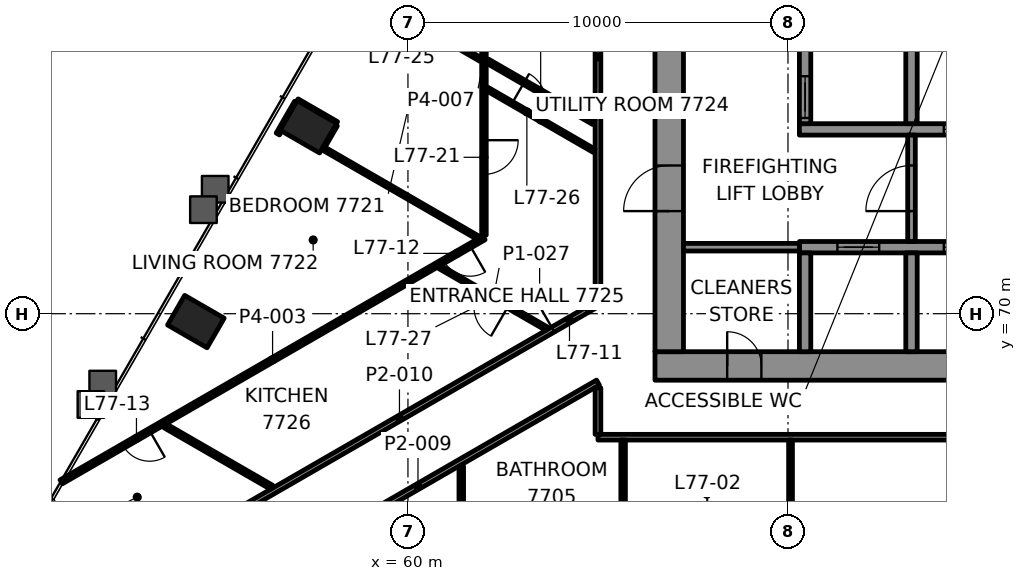
"""IFC4 building model, lengths in metres.
Left out: names, types, materials, properties, quantities, classifications, styles, units other than length and angle.
Written with IfcOpenShell. Run it as: python <this file> out.ifc"""

import sys

from ifc_helpers import new_model, si_unit, direction, frame, frame_2d, origin, origin_2d, place, context, subcontext, project, spatial, rectangle, hollow_rectangle, extrude, element, fill, save


model = new_model("IFC4")
c1 = context("Model", 3, precision=1e-05, world=origin(), true_north=direction((0.0, 1.0)))
c2 = subcontext(c1, "Body", "Model", "MODEL_VIEW")
j1 = project(units=[si_unit("LENGTHUNIT", "METRE"), si_unit("PLANEANGLEUNIT", "RADIAN")], contexts=[c1])
p1 = place(None, origin())
s1 = spatial("IfcSite", under=j1, at=p1, CompositionType="ELEMENT")
p2 = place(p1, origin())
s2 = spatial("IfcBuilding", under=s1, at=p2, CompositionType="ELEMENT")
p3 = place(p2, frame((0.0, 0.0, 316.1)))
s3 = spatial("IfcBuildingStorey", under=s2, at=p3, CompositionType="ELEMENT", Elevation=316.1)
for number, where, z_axis, x_axis in (
    (1, (57.379, 74.919, -0.0), (0.0, 0.0, 1.0), (-0.5, -0.866, 0.0)),
    (2, (54.419, 69.793, -0.0), (0.0, 0.0, 1.0), (-0.5, -0.866, 0.0)),
):
    element("IfcColumn", number, at=place(p3, frame(where, z_axis=z_axis, x_axis=x_axis)), inside=s3, PredefinedType="COLUMN", context=c2, shape_type="SweptSolid", body=[
        extrude(hollow_rectangle(XDim=0.9, YDim=1.2, WallThickness=0.06, at=origin_2d()), origin(), (0.0, 0.0, 1.0), 3.5),
    ])
p4 = place(p3, frame((66.5, 68.625, 0.0), z_axis=(0.0, 0.0, 1.0), x_axis=(1.0, 0.0, 0.0)))
e3 = element("IfcWall", 3, at=p4, inside=s3, PredefinedType="SHEAR", context=c2, shape_type="SweptSolid", body=[
    extrude(rectangle(XDim=17.0, YDim=0.75, at=frame_2d((8.5, 0.0))), origin(), (0.0, 0.0, 1.0), 3.3),
])
p5 = place(p4, frame((1.9, 0.0, 0.0)))
e4 = element("IfcOpeningElement", 4, at=p5, cuts=e3, PredefinedType="OPENING", context=c2, shape_type="SweptSolid", body=[
    extrude(rectangle(XDim=0.9, YDim=2.1, at=frame_2d((0.45, 1.05))), frame((0.0, 0.385, 0.0), z_axis=(0.0, -1.0, 0.0), x_axis=(1.0, 0.0, 0.0)), (0.0, 0.0, 1.0), 0.77),
])
p6 = place(p3, frame((66.875, 69.0, 0.0), z_axis=(0.0, 0.0, 1.0), x_axis=(0.0, 1.0, 0.0)))
e5 = element("IfcWall", 5, at=p6, inside=s3, PredefinedType="SHEAR", context=c2, shape_type="SweptSolid", body=[
    extrude(rectangle(XDim=12.0, YDim=0.75, at=frame_2d((6.0, 0.0))), origin(), (0.0, 0.0, 1.0), 3.3),
])
p7 = place(p6, frame((3.7, 0.0, 0.0)))
e6 = element("IfcOpeningElement", 6, at=p7, cuts=e5, PredefinedType="OPENING", context=c2, shape_type="SweptSolid", body=[
    extrude(rectangle(XDim=1.2, YDim=2.1, at=frame_2d((0.6, 1.05))), frame((0.0, 0.385, 0.0), z_axis=(0.0, -1.0, 0.0), x_axis=(1.0, 0.0, 0.0)), (0.0, 0.0, 1.0), 0.77),
])
p8 = place(p3, frame((70.3, 71.75, 0.0), z_axis=(0.0, 0.0, 1.0), x_axis=(1.0, 0.0, 0.0)))
e7 = element("IfcWall", 7, at=p8, inside=s3, PredefinedType="SHEAR", context=c2, shape_type="SweptSolid", body=[
    extrude(rectangle(XDim=11.5, YDim=0.3, at=frame_2d((5.75, 0.0))), origin(), (0.0, 0.0, 1.0), 3.3),
])
p9 = place(p8, frame((1.0, 0.0, 0.0)))
e8 = element("IfcOpeningElement", 8, at=p9, cuts=e7, PredefinedType="OPENING", context=c2, shape_type="SweptSolid", body=[
    extrude(rectangle(XDim=1.1, YDim=2.1, at=frame_2d((0.55, 1.05))), frame((0.0, 0.16, 0.0), z_axis=(0.0, -1.0, 0.0), x_axis=(1.0, 0.0, 0.0)), (0.0, 0.0, 1.0), 0.32),
])
p10 = place(p8, frame((3.8, 0.0, 0.0)))
e9 = element("IfcOpeningElement", 9, at=p10, cuts=e7, PredefinedType="OPENING", context=c2, shape_type="SweptSolid", body=[
    extrude(rectangle(XDim=1.1, YDim=2.1, at=frame_2d((0.55, 1.05))), frame((0.0, 0.16, 0.0), z_axis=(0.0, -1.0, 0.0), x_axis=(1.0, 0.0, 0.0)), (0.0, 0.0, 1.0), 0.32),
])
p11 = place(p8, frame((6.6, 0.0, 0.0)))
e10 = element("IfcOpeningElement", 10, at=p11, cuts=e7, PredefinedType="OPENING", context=c2, shape_type="SweptSolid", body=[
    extrude(rectangle(XDim=1.1, YDim=2.1, at=frame_2d((0.55, 1.05))), frame((0.0, 0.16, 0.0), z_axis=(0.0, -1.0, 0.0), x_axis=(1.0, 0.0, 0.0)), (0.0, 0.0, 1.0), 0.32),
])
p12 = place(p8, frame((9.4, 0.0, 0.0)))
e11 = element("IfcOpeningElement", 11, at=p12, cuts=e7, PredefinedType="OPENING", context=c2, shape_type="SweptSolid", body=[
    extrude(rectangle(XDim=1.1, YDim=2.1, at=frame_2d((0.55, 1.05))), frame((0.0, 0.16, 0.0), z_axis=(0.0, -1.0, 0.0), x_axis=(1.0, 0.0, 0.0)), (0.0, 0.0, 1.0), 0.32),
])
p13 = place(p3, frame((70.3, 74.85, 0.0), z_axis=(0.0, 0.0, 1.0), x_axis=(1.0, 0.0, 0.0)))
e12 = element("IfcWall", 12, at=p13, inside=s3, PredefinedType="SHEAR", context=c2, shape_type="SweptSolid", body=[
    extrude(rectangle(XDim=5.9, YDim=0.3, at=frame_2d((2.95, 0.0))), origin(), (0.0, 0.0, 1.0), 3.3),
])
p14 = place(p13, frame((3.8, 0.0, 0.0)))
e13 = element("IfcOpeningElement", 13, at=p14, cuts=e12, PredefinedType="OPENING", context=c2, shape_type="SweptSolid", body=[
    extrude(rectangle(XDim=1.1, YDim=2.1, at=frame_2d((0.55, 1.05))), frame((0.0, 0.16, 0.0), z_axis=(0.0, -1.0, 0.0), x_axis=(1.0, 0.0, 0.0)), (0.0, 0.0, 1.0), 0.32),
])
p15 = place(p3, frame((70.45, 69.0, 0.0), z_axis=(0.0, 0.0, 1.0), x_axis=(0.0, 1.0, 0.0)))
e14 = element("IfcWall", 14, at=p15, inside=s3, PredefinedType="SHEAR", context=c2, shape_type="SweptSolid", body=[
    extrude(rectangle(XDim=2.6, YDim=0.3, at=frame_2d((1.3, 0.0))), origin(), (0.0, 0.0, 1.0), 3.3),
])
p16 = place(p3, frame((70.45, 75.0, 0.0), z_axis=(0.0, 0.0, 1.0), x_axis=(0.0, 1.0, 0.0)))
e15 = element("IfcWall", 15, at=p16, inside=s3, PredefinedType="SHEAR", context=c2, shape_type="SweptSolid", body=[
    extrude(rectangle(XDim=2.6, YDim=0.3, at=frame_2d((1.3, 0.0))), origin(), (0.0, 0.0, 1.0), 3.3),
])
p17 = place(p16, frame((0.15, 0.0, 0.0)))
e16 = element("IfcOpeningElement", 16, at=p17, cuts=e15, PredefinedType="OPENING", context=c2, shape_type="SweptSolid", body=[
    extrude(rectangle(XDim=1.1, YDim=2.1, at=frame_2d((0.55, 1.05))), frame((0.0, 0.16, 0.0), z_axis=(0.0, -1.0, 0.0), x_axis=(1.0, 0.0, 0.0)), (0.0, 0.0, 1.0), 0.32),
])
for number, where, z_axis, x_axis in (
    (17, (73.25, 69.0, 0.0), (0.0, 0.0, 1.0), (0.0, 1.0, 0.0)),
    (18, (73.25, 75.0, 0.0), (0.0, 0.0, 1.0), (0.0, 1.0, 0.0)),
):
    element("IfcWall", number, at=place(p3, frame(where, z_axis=z_axis, x_axis=x_axis)), inside=s3, PredefinedType="SHEAR", context=c2, shape_type="SweptSolid", body=[
        extrude(rectangle(XDim=2.6, YDim=0.3, at=frame_2d((1.3, 0.0))), origin(), (0.0, 0.0, 1.0), 3.3),
    ])
p18 = place(p3, frame((85.0, 66.75, 0.0), z_axis=(0.0, 0.0, 1.0), x_axis=(-1.0, 0.0, 0.0)))
e19 = element("IfcWall", 19, at=p18, inside=s3, PredefinedType="PARTITIONING", context=c2, shape_type="SweptSolid", body=[
    extrude(rectangle(XDim=20.0, YDim=0.15, at=frame_2d((10.0, 0.0))), origin(), (0.0, 0.0, 1.0), 2.7),
])
p19 = place(p18, frame((2.135, 0.0, 0.0)))
e20 = element("IfcOpeningElement", 20, at=p19, cuts=e19, PredefinedType="OPENING", context=c2, shape_type="SweptSolid", body=[
    extrude(rectangle(XDim=1.0, YDim=2.1, at=frame_2d((0.5, 1.05))), frame((0.0, 0.085, 0.0), z_axis=(0.0, -1.0, 0.0), x_axis=(1.0, 0.0, 0.0)), (0.0, 0.0, 1.0), 0.17),
])
p20 = place(p18, frame((9.55, 0.0, 0.0)))
e21 = element("IfcOpeningElement", 21, at=p20, cuts=e19, PredefinedType="OPENING", context=c2, shape_type="SweptSolid", body=[
    extrude(rectangle(XDim=0.9, YDim=2.1, at=frame_2d((0.45, 1.05))), frame((0.0, 0.085, 0.0), z_axis=(0.0, -1.0, 0.0), x_axis=(1.0, 0.0, 0.0)), (0.0, 0.0, 1.0), 0.17),
])
p21 = place(p3, frame((65.0, 68.187, 0.0), z_axis=(0.0, 0.0, 1.0), x_axis=(-0.866028339337, -0.499994915439, 0.0)))
e22 = element("IfcWall", 22, at=p21, inside=s3, PredefinedType="PARTITIONING", context=c2, shape_type="SweptSolid", body=[
    extrude(rectangle(XDim=10.937, YDim=0.15, at=frame_2d((5.468, 0.0))), origin(), (0.0, 0.0, 1.0), 2.697),
])
p22 = place(p21, frame((6.943, 0.0, 0.0)))
e23 = element("IfcOpeningElement", 23, at=p22, cuts=e22, PredefinedType="OPENING", context=c2, shape_type="SweptSolid", body=[
    extrude(rectangle(XDim=1.0, YDim=2.1, at=frame_2d((0.5, 1.05))), frame((0.0, 0.085, 0.0), z_axis=(0.0, -1.0, 0.0), x_axis=(1.0, 0.0, 0.0)), (0.0, 0.0, 1.0), 0.17),
])
p23 = place(p3, frame((54.628, 64.278, 0.0), z_axis=(0.0, 0.0, 1.0), x_axis=(0.866033426221, 0.499986104476, 0.0)))
e24 = element("IfcWall", 24, at=p23, inside=s3, PredefinedType="PARTITIONING", context=c2, shape_type="SweptSolid", body=[
    extrude(rectangle(XDim=11.89, YDim=0.15, at=frame_2d((5.945, 0.0))), origin(), (0.0, 0.0, 1.0), 2.7),
])
p24 = place(p23, frame((10.612, 0.0, 0.0)))
e25 = element("IfcOpeningElement", 25, at=p24, cuts=e24, PredefinedType="OPENING", context=c2, shape_type="SweptSolid", body=[
    extrude(rectangle(XDim=1.0, YDim=2.1, at=frame_2d((0.5, 1.05))), frame((0.0, 0.085, 0.0), z_axis=(0.0, -1.0, 0.0), x_axis=(1.0, 0.0, 0.0)), (0.0, 0.0, 1.0), 0.17),
])
p25 = place(p3, frame((62.0, 71.998, 0.0), z_axis=(0.0, 0.0, 1.0), x_axis=(-0.866023842607, -0.500002704028, 0.0)))
e26 = element("IfcWall", 26, at=p25, inside=s3, PredefinedType="PARTITIONING", context=c2, shape_type="SweptSolid", body=[
    extrude(rectangle(XDim=12.845, YDim=0.12, at=frame_2d((6.422, 0.0))), origin(), (0.0, 0.0, 1.0), 2.7),
])
p26 = place(p25, frame((0.421, 0.0, 0.0)))
e27 = element("IfcOpeningElement", 27, at=p26, cuts=e26, PredefinedType="OPENING", context=c2, shape_type="SweptSolid", body=[
    extrude(rectangle(XDim=0.8, YDim=2.1, at=frame_2d((0.4, 1.05))), frame((0.0, 0.07, 0.0), z_axis=(0.0, -1.0, 0.0), x_axis=(1.0, 0.0, 0.0)), (0.0, 0.0, 1.0), 0.14),
])
p27 = place(p25, frame((10.158, 0.0, 0.0)))
e28 = element("IfcOpeningElement", 28, at=p27, cuts=e26, PredefinedType="OPENING", context=c2, shape_type="SweptSolid", body=[
    extrude(rectangle(XDim=0.8, YDim=2.1, at=frame_2d((0.4, 1.05))), frame((0.0, 0.07, 0.0), z_axis=(0.0, -1.0, 0.0), x_axis=(1.0, 0.0, 0.0)), (0.0, 0.0, 1.0), 0.14),
])
p28 = place(p3, frame((57.776, 74.406, 0.0), z_axis=(0.0, 0.0, 1.0), x_axis=(0.500246099629, 0.865883271467, 0.0)))
e29 = element("IfcWall", 29, at=p28, inside=s3, PredefinedType="PARTITIONING", context=c2, shape_type="SweptSolid", body=[
    extrude(rectangle(XDim=0.646, YDim=0.1, at=frame_2d((0.323, 0.0))), origin(), (0.0, 0.0, 1.0), 2.7),
])
p29 = place(p3, frame((56.576, 74.729, 0.0), z_axis=(0.0, 0.0, 1.0), x_axis=(0.500079715141, 0.865979375335, 0.0)))
e30 = element("IfcWall", 30, at=p29, inside=s3, PredefinedType="PARTITIONING", context=c2, shape_type="SweptSolid", body=[
    extrude(rectangle(XDim=0.966, YDim=0.1, at=frame_2d((0.483, 0.0))), origin(), (0.0, 0.0, 1.0), 2.7),
])
p30 = place(p3, frame((70.067, 58.82, 0.0), z_axis=(0.0, 0.0, 1.0), x_axis=(0.0, 1.0, 0.0)))
e31 = element("IfcWall", 31, at=p30, inside=s3, PredefinedType="PARTITIONING", context=c2, shape_type="SweptSolid", body=[
    extrude(rectangle(XDim=7.855, YDim=0.1, at=frame_2d((3.927, 0.0))), origin(), (0.0, 0.0, 1.0), 2.688),
])
p31 = place(p3, frame((65.662, 63.81, 0.0), z_axis=(0.0, 0.0, 1.0), x_axis=(0.0, 1.0, 0.0)))
e32 = element("IfcWall", 32, at=p31, inside=s3, PredefinedType="PARTITIONING", context=c2, shape_type="SweptSolid", body=[
    extrude(rectangle(XDim=2.865, YDim=0.12, at=frame_2d((1.433, 0.0))), origin(), (0.0, 0.0, 1.0), 2.7),
])
p32 = place(p3, frame((65.0, 66.825, 0.0), z_axis=(0.0, 0.0, 1.0), x_axis=(0.0, 1.0, 0.0)))
e33 = element("IfcWall", 33, at=p32, inside=s3, PredefinedType="PARTITIONING", context=c2, shape_type="SweptSolid", body=[
    extrude(rectangle(XDim=1.226, YDim=0.15, at=frame_2d((0.613, 0.0))), origin(), (0.0, 0.0, 1.0), 2.697),
])
p33 = place(p3, frame((65.0, 70.266, 0.0), z_axis=(0.0, 0.0, 1.0), x_axis=(0.0, 1.0, 0.0)))
e34 = element("IfcWall", 34, at=p33, inside=s3, PredefinedType="PARTITIONING", context=c2, shape_type="SweptSolid", body=[
    extrude(rectangle(XDim=12.984, YDim=0.15, at=frame_2d((6.492, 0.0))), origin(), (0.0, 0.0, 1.0), 2.7),
])
p34 = place(p3, frame((62.0, 81.366, 0.0), z_axis=(0.0, 0.0, 1.0), x_axis=(0.0, -1.0, 0.0)))
e35 = element("IfcWall", 35, at=p34, inside=s3, PredefinedType="PARTITIONING", context=c2, shape_type="SweptSolid", body=[
    extrude(rectangle(XDim=9.299, YDim=0.12, at=frame_2d((4.649, 0.0))), origin(), (0.0, 0.0, 1.0), 2.7),
])
p35 = place(p34, frame((2.033, 0.0, 0.0)))
e36 = element("IfcOpeningElement", 36, at=p35, cuts=e35, PredefinedType="OPENING", context=c2, shape_type="SweptSolid", body=[
    extrude(rectangle(XDim=0.8, YDim=2.1, at=frame_2d((0.4, 1.05))), frame((0.0, 0.07, 0.0), z_axis=(0.0, -1.0, 0.0), x_axis=(1.0, 0.0, 0.0)), (0.0, 0.0, 1.0), 0.14),
])
p36 = place(p34, frame((6.8, 0.0, 0.0)))
e37 = element("IfcOpeningElement", 37, at=p36, cuts=e35, PredefinedType="OPENING", context=c2, shape_type="SweptSolid", body=[
    extrude(rectangle(XDim=0.9, YDim=2.1, at=frame_2d((0.45, 1.05))), frame((0.0, 0.07, 0.0), z_axis=(0.0, -1.0, 0.0), x_axis=(1.0, 0.0, 0.0)), (0.0, 0.0, 1.0), 0.14),
])
p37 = place(p3, frame((61.403, 62.756, 0.0), z_axis=(0.0, 0.0, 1.0), x_axis=(0.0, 1.0, 0.0)))
e38 = element("IfcWall", 38, at=p37, inside=s3, PredefinedType="PARTITIONING", context=c2, shape_type="SweptSolid", body=[
    extrude(rectangle(XDim=3.228, YDim=0.12, at=frame_2d((1.614, 0.0))), origin(), (0.0, 0.0, 1.0), 2.697),
])
p38 = place(p3, frame((64.89, 75.031, 0.0), z_axis=(0.0, 0.0, 1.0), x_axis=(-0.866033195618, 0.499986503906, 0.0)))
e39 = element("IfcWall", 39, at=p38, inside=s3, PredefinedType="PARTITIONING", context=c2, shape_type="SweptSolid", body=[
    extrude(rectangle(XDim=3.228, YDim=0.12, at=frame_2d((1.614, 0.0))), origin(), (0.0, 0.0, 1.0), 2.7),
])
p39 = place(p3, frame((58.447, 78.689, 0.0), z_axis=(0.0, 0.0, 1.0), x_axis=(0.866035275801, -0.499982900776, 0.0)))
e40 = element("IfcWall", 40, at=p39, inside=s3, PredefinedType="PARTITIONING", context=c2, shape_type="SweptSolid", body=[
    extrude(rectangle(XDim=4.003, YDim=0.1, at=frame_2d((2.001, 0.0))), origin(), (0.0, 0.0, 1.0), 2.688),
])
p40 = place(p39, frame((1.732, 0.0, 0.0)))
e41 = element("IfcOpeningElement", 41, at=p40, cuts=e40, PredefinedType="OPENING", context=c2, shape_type="SweptSolid", body=[
    extrude(rectangle(XDim=0.9, YDim=2.1, at=frame_2d((0.45, 1.05))), frame((0.0, 0.06, 0.0), z_axis=(0.0, -1.0, 0.0), x_axis=(1.0, 0.0, 0.0)), (0.0, 0.0, 1.0), 0.12),
])
p41 = place(p3, frame((62.086, 75.912, 0.0), z_axis=(0.0, 0.0, 1.0), x_axis=(0.866032882975, -0.499987045439, 0.0)))
e42 = element("IfcWall", 42, at=p41, inside=s3, PredefinedType="PARTITIONING", context=c2, shape_type="SweptSolid", body=[
    extrude(rectangle(XDim=3.248, YDim=0.1, at=frame_2d((1.624, 0.0))), origin(), (0.0, 0.0, 1.0), 2.7),
])
p42 = place(p41, frame((0.754, 0.0, 0.0)))
e43 = element("IfcOpeningElement", 43, at=p42, cuts=e42, PredefinedType="OPENING", context=c2, shape_type="SweptSolid", body=[
    extrude(rectangle(XDim=0.9, YDim=2.1, at=frame_2d((0.45, 1.05))), frame((0.0, 0.06, 0.0), z_axis=(0.0, -1.0, 0.0), x_axis=(1.0, 0.0, 0.0)), (0.0, 0.0, 1.0), 0.12),
])
p43 = place(p3, frame((58.124, 75.01, 0.0), z_axis=(0.0, 0.0, 1.0), x_axis=(-0.865978732077, 0.500080829057, 0.0)))
e44 = element("IfcWall", 44, at=p43, inside=s3, PredefinedType="PARTITIONING", context=c2, shape_type="SweptSolid", body=[
    extrude(rectangle(XDim=1.199, YDim=0.1, at=frame_2d((0.6, 0.0))), origin(), (0.0, 0.0, 1.0), 2.688),
])
p44 = place(p3, frame((61.837, 72.003, 0.0), z_axis=(0.0, 0.0, 1.0), x_axis=(-0.86602790099, 0.499995674689, 0.0)))
e45 = element("IfcWall", 45, at=p44, inside=s3, PredefinedType="PARTITIONING", context=c2, shape_type="SweptSolid", body=[
    extrude(rectangle(XDim=4.718, YDim=0.1, at=frame_2d((2.359, 0.0))), origin(), (0.0, 0.0, 1.0), 2.7),
])
p45 = place(p3, frame((63.652, 69.604, 0.0), z_axis=(0.0, 0.0, 1.0), x_axis=(-0.866032882975, 0.499987045439, 0.0)))
e46 = element("IfcWall", 46, at=p45, inside=s3, PredefinedType="PARTITIONING", context=c2, shape_type="SweptSolid", body=[
    extrude(rectangle(XDim=3.248, YDim=0.1, at=frame_2d((1.624, 0.0))), origin(), (0.0, 0.0, 1.0), 2.7),
])
p46 = place(p45, frame((1.174, 0.0, 0.0)))
e47 = element("IfcOpeningElement", 47, at=p46, cuts=e46, PredefinedType="OPENING", context=c2, shape_type="SweptSolid", body=[
    extrude(rectangle(XDim=0.9, YDim=2.1, at=frame_2d((0.45, 1.05))), frame((0.0, 0.06, 0.0), z_axis=(0.0, -1.0, 0.0), x_axis=(1.0, 0.0, 0.0)), (0.0, 0.0, 1.0), 0.12),
])
p47 = place(p3, frame((56.41, 65.433, 0.0), z_axis=(0.0, 0.0, 1.0), x_axis=(-0.866000447062, 0.500043223821, 0.0)))
e48 = element("IfcWall", 48, at=p47, inside=s3, PredefinedType="PARTITIONING", context=c2, shape_type="SweptSolid", body=[
    extrude(rectangle(XDim=3.228, YDim=0.12, at=frame_2d((1.614, 0.0))), origin(), (0.0, 0.0, 1.0), 2.7),
])
p48 = place(p3, frame((67.25, 71.75, 0.0), z_axis=(0.0, 0.0, 1.0), x_axis=(1.0, 0.0, 0.0)))
e49 = element("IfcWall", 49, at=p48, inside=s3, PredefinedType="PARTITIONING", context=c2, shape_type="SweptSolid", body=[
    extrude(rectangle(XDim=3.05, YDim=0.2, at=frame_2d((1.525, 0.0))), origin(), (0.0, 0.0, 1.0), 3.3),
])
p49 = place(p3, frame((73.25, 71.9, 0.0), z_axis=(0.0, 0.0, 1.0), x_axis=(0.0, 1.0, 0.0)))
e50 = element("IfcWall", 50, at=p49, inside=s3, PredefinedType="PARTITIONING", context=c2, shape_type="SweptSolid", body=[
    extrude(rectangle(XDim=2.8, YDim=0.2, at=frame_2d((1.4, 0.0))), origin(), (0.0, 0.0, 1.0), 3.3),
])
p50 = place(p49, frame((0.8, 0.0, 0.0)))
e51 = element("IfcOpeningElement", 51, at=p50, cuts=e50, PredefinedType="OPENING", context=c2, shape_type="SweptSolid", body=[
    extrude(rectangle(XDim=1.2, YDim=2.1, at=frame_2d((0.6, 1.05))), frame((0.0, 0.11, 0.0), z_axis=(0.0, -1.0, 0.0), x_axis=(1.0, 0.0, 0.0)), (0.0, 0.0, 1.0), 0.22),
])
p51 = place(p24, origin())
e52 = element("IfcDoor", 52, at=p51, inside=s3, OperationType="SINGLE_SWING_RIGHT", PredefinedType="DOOR", context=c2, shape_type="SweptSolid", body=[
    extrude(rectangle(XDim=1.0, YDim=2.1, at=frame_2d((0.5, 1.05))), frame((0.0, 0.025, 0.0), z_axis=(0.0, -1.0, 0.0), x_axis=(1.0, 0.0, 0.0)), (0.0, 0.0, 1.0), 0.05),
])
fill(e25, e52)
p52 = place(p26, origin())
e53 = element("IfcDoor", 53, at=p52, inside=s3, OperationType="SINGLE_SWING_RIGHT", PredefinedType="DOOR", context=c2, shape_type="SweptSolid", body=[
    extrude(rectangle(XDim=0.8, YDim=2.1, at=frame_2d((0.4, 1.05))), frame((0.0, 0.025, 0.0), z_axis=(0.0, -1.0, 0.0), x_axis=(1.0, 0.0, 0.0)), (0.0, 0.0, 1.0), 0.05),
])
fill(e27, e53)
p53 = place(p27, origin())
e54 = element("IfcDoor", 54, at=p53, inside=s3, OperationType="SINGLE_SWING_RIGHT", PredefinedType="DOOR", context=c2, shape_type="SweptSolid", body=[
    extrude(rectangle(XDim=0.8, YDim=2.1, at=frame_2d((0.4, 1.05))), frame((0.0, 0.025, 0.0), z_axis=(0.0, -1.0, 0.0), x_axis=(1.0, 0.0, 0.0)), (0.0, 0.0, 1.0), 0.05),
])
fill(e28, e54)
p54 = place(p36, origin())
e55 = element("IfcDoor", 55, at=p54, inside=s3, OperationType="SINGLE_SWING_RIGHT", PredefinedType="DOOR", context=c2, shape_type="SweptSolid", body=[
    extrude(rectangle(XDim=0.9, YDim=2.1, at=frame_2d((0.45, 1.05))), frame((0.0, 0.025, 0.0), z_axis=(0.0, -1.0, 0.0), x_axis=(1.0, 0.0, 0.0)), (0.0, 0.0, 1.0), 0.05),
])
fill(e37, e55)
p55 = place(p42, origin())
e56 = element("IfcDoor", 56, at=p55, inside=s3, OperationType="SINGLE_SWING_LEFT", PredefinedType="DOOR", context=c2, shape_type="SweptSolid", body=[
    extrude(rectangle(XDim=0.9, YDim=2.1, at=frame_2d((0.45, 1.05))), frame((0.0, 0.025, 0.0), z_axis=(0.0, -1.0, 0.0), x_axis=(1.0, 0.0, 0.0)), (0.0, 0.0, 1.0), 0.05),
])
fill(e43, e56)
p56 = place(p46, origin())
e57 = element("IfcDoor", 57, at=p56, inside=s3, OperationType="SINGLE_SWING_RIGHT", PredefinedType="DOOR", context=c2, shape_type="SweptSolid", body=[
    extrude(rectangle(XDim=0.9, YDim=2.1, at=frame_2d((0.45, 1.05))), frame((0.0, 0.025, 0.0), z_axis=(0.0, -1.0, 0.0), x_axis=(1.0, 0.0, 0.0)), (0.0, 0.0, 1.0), 0.05),
])
fill(e47, e57)
p57 = place(p9, origin())
e58 = element("IfcDoor", 58, at=p57, inside=s3, OperationType="DOUBLE_DOOR_SLIDING", PredefinedType="DOOR", context=c2, shape_type="SweptSolid", body=[
    extrude(rectangle(XDim=1.1, YDim=2.1, at=frame_2d((0.55, 1.05))), frame((0.0, 0.025, 0.0), z_axis=(0.0, -1.0, 0.0), x_axis=(1.0, 0.0, 0.0)), (0.0, 0.0, 1.0), 0.05),
])
fill(e8, e58)
p58 = place(p10, origin())
e59 = element("IfcDoor", 59, at=p58, inside=s3, OperationType="DOUBLE_DOOR_SLIDING", PredefinedType="DOOR", context=c2, shape_type="SweptSolid", body=[
    extrude(rectangle(XDim=1.1, YDim=2.1, at=frame_2d((0.55, 1.05))), frame((0.0, 0.025, 0.0), z_axis=(0.0, -1.0, 0.0), x_axis=(1.0, 0.0, 0.0)), (0.0, 0.0, 1.0), 0.05),
])
fill(e9, e59)
p59 = place(p17, origin())
e60 = element("IfcDoor", 60, at=p59, inside=s3, OperationType="DOUBLE_DOOR_SLIDING", PredefinedType="DOOR", context=c2, shape_type="SweptSolid", body=[
    extrude(rectangle(XDim=1.1, YDim=2.1, at=frame_2d((0.55, 1.05))), frame((0.0, 0.025, 0.0), z_axis=(0.0, -1.0, 0.0), x_axis=(1.0, 0.0, 0.0)), (0.0, 0.0, 1.0), 0.05),
])
fill(e16, e60)
p60 = place(p14, origin())
e61 = element("IfcDoor", 61, at=p60, inside=s3, OperationType="DOUBLE_DOOR_SLIDING", PredefinedType="DOOR", context=c2, shape_type="SweptSolid", body=[
    extrude(rectangle(XDim=1.1, YDim=2.1, at=frame_2d((0.55, 1.05))), frame((0.0, 0.025, 0.0), z_axis=(0.0, -1.0, 0.0), x_axis=(1.0, 0.0, 0.0)), (0.0, 0.0, 1.0), 0.05),
])
fill(e13, e61)
p61 = place(p50, origin())
e62 = element("IfcDoor", 62, at=p61, inside=s3, OperationType="SINGLE_SWING_LEFT", PredefinedType="DOOR", context=c2, shape_type="SweptSolid", body=[
    extrude(rectangle(XDim=1.2, YDim=2.1, at=frame_2d((0.6, 1.05))), frame((0.0, 0.025, 0.0), z_axis=(0.0, -1.0, 0.0), x_axis=(1.0, 0.0, 0.0)), (0.0, 0.0, 1.0), 0.05),
])
fill(e51, e62)
p62 = place(p7, origin())
e63 = element("IfcDoor", 63, at=p62, inside=s3, OperationType="SINGLE_SWING_RIGHT", PredefinedType="DOOR", context=c2, shape_type="SweptSolid", body=[
    extrude(rectangle(XDim=1.2, YDim=2.1, at=frame_2d((0.6, 1.05))), frame((0.0, 0.095, 0.0), z_axis=(0.0, -1.0, 0.0), x_axis=(1.0, 0.0, 0.0)), (0.0, 0.0, 1.0), 0.19),
])
fill(e6, e63)
p63 = place(p5, origin())
e64 = element("IfcDoor", 64, at=p63, inside=s3, OperationType="SINGLE_SWING_RIGHT", PredefinedType="DOOR", context=c2, shape_type="SweptSolid", body=[
    extrude(rectangle(XDim=0.9, YDim=2.1, at=frame_2d((0.45, 1.05))), frame((0.0, 0.095, 0.0), z_axis=(0.0, -1.0, 0.0), x_axis=(1.0, 0.0, 0.0)), (0.0, 0.0, 1.0), 0.19),
])
fill(e4, e64)
save(model, sys.argv[1])
